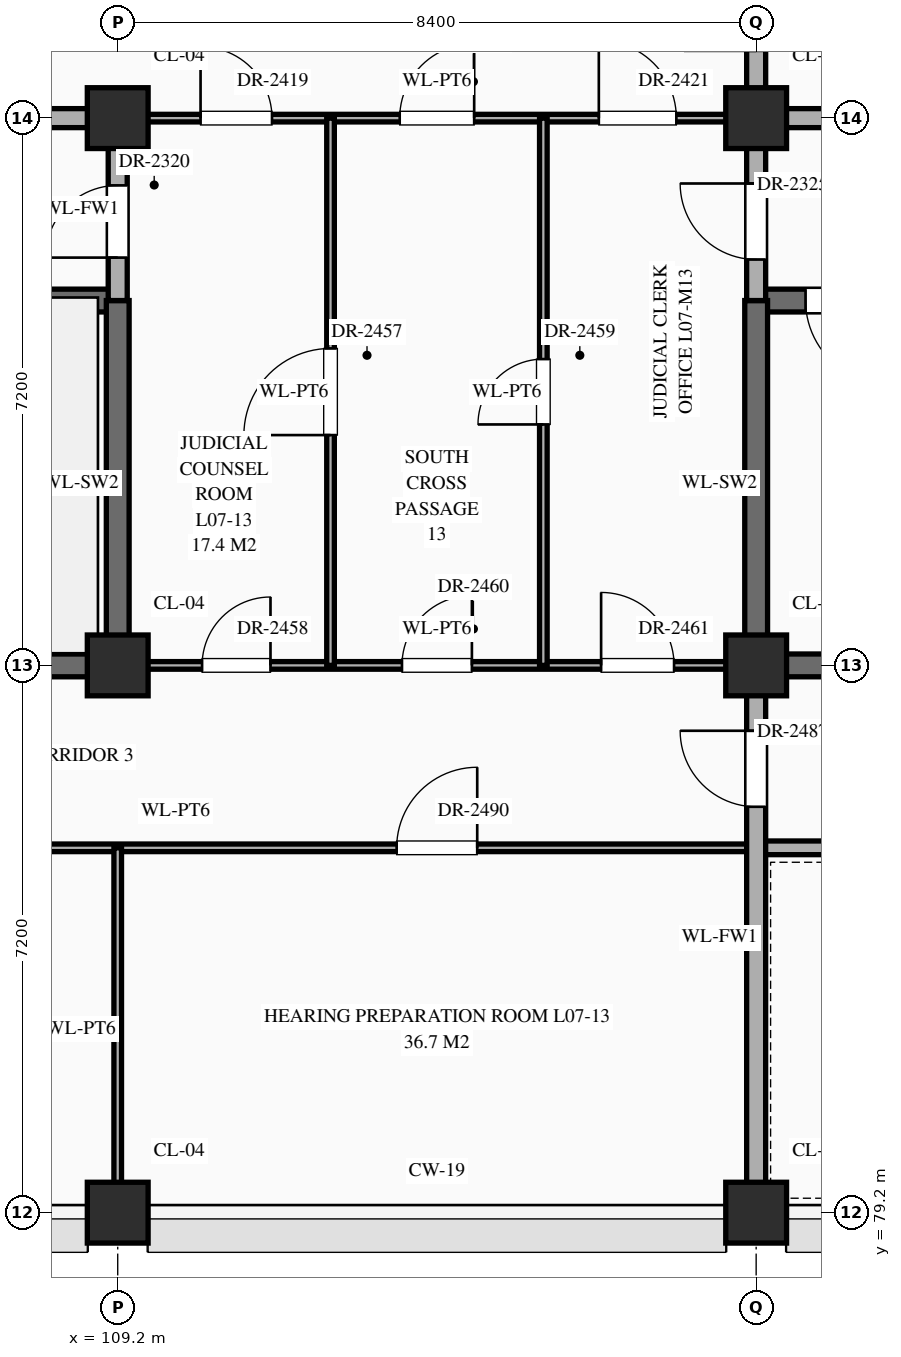
"""IFC4 building model, lengths in metres.
Left out: names, types, materials, properties, quantities, classifications, styles, units other than length and angle.
Written with IfcOpenShell. Run it as: python <this file> out.ifc"""

import sys

from ifc_helpers import new_model, si_unit, direction, frame, frame_2d, origin, origin_2d, place, context, subcontext, project, spatial, rectangle, extrude, element, fill, save


model = new_model("IFC4")
c1 = context("Model", 3, precision=1e-05, world=origin(), true_north=direction((0.0, 1.0)))
c2 = subcontext(c1, "Body", "Model", "MODEL_VIEW")
j1 = project(units=[si_unit("LENGTHUNIT", "METRE"), si_unit("PLANEANGLEUNIT", "RADIAN")], contexts=[c1])
p1 = place(None, origin())
s1 = spatial("IfcSite", under=j1, at=p1, CompositionType="ELEMENT")
p2 = place(p1, origin())
s2 = spatial("IfcBuilding", under=s1, at=p2, CompositionType="ELEMENT")
p3 = place(p2, frame((0.0, 0.0, 30.6)))
s3 = spatial("IfcBuildingStorey", under=s2, at=p3, CompositionType="ELEMENT", Elevation=30.6)
for number, where, z_axis, x_axis in (
    (1, (109.2, 79.2, 0.0), (0.0, 0.0, 1.0), (1.0, 0.0, 0.0)),
    (2, (109.2, 86.4, 0.0), (0.0, 0.0, 1.0), (1.0, 0.0, 0.0)),
    (3, (109.2, 93.6, 0.0), (0.0, 0.0, 1.0), (1.0, 0.0, 0.0)),
    (4, (117.6, 79.2, 0.0), (0.0, 0.0, 1.0), (1.0, 0.0, 0.0)),
    (5, (117.6, 86.4, 0.0), (0.0, 0.0, 1.0), (1.0, 0.0, 0.0)),
    (6, (117.6, 93.6, 0.0), (0.0, 0.0, 1.0), (1.0, 0.0, 0.0)),
):
    element("IfcColumn", number, at=place(p3, frame(where, z_axis=z_axis, x_axis=x_axis)), inside=s3, PredefinedType="COLUMN", context=c2, shape_type="SweptSolid", body=[
        extrude(rectangle(XDim=0.8, YDim=0.8, at=origin_2d()), origin(), (0.0, 0.0, 1.0), 4.5),
    ])
p4 = place(p3, frame((100.8, 84.0, 0.0), z_axis=(0.0, 0.0, 1.0), x_axis=(1.0, 0.0, 0.0)))
e7 = element("IfcWall", 7, at=p4, inside=s3, PredefinedType="STANDARD", context=c2, shape_type="SweptSolid", body=[
    extrude(rectangle(XDim=16.8, YDim=0.1, at=frame_2d((8.4, 0.0))), origin(), (0.0, 0.0, 1.0), 4.24),
])
p5 = place(p4, frame((3.69, 0.0, 0.0)))
e8 = element("IfcOpeningElement", 8, at=p5, cuts=e7, PredefinedType="OPENING", context=c2, shape_type="SweptSolid", body=[
    extrude(rectangle(XDim=1.02, YDim=2.4, at=frame_2d((0.51, 1.2))), frame((0.0, 0.062, 0.0), z_axis=(0.0, -1.0, 0.0), x_axis=(1.0, 0.0, 0.0)), (0.0, 0.0, 1.0), 0.124),
])
p6 = place(p4, frame((12.07, 0.0, 0.0)))
e9 = element("IfcOpeningElement", 9, at=p6, cuts=e7, PredefinedType="OPENING", context=c2, shape_type="SweptSolid", body=[
    extrude(rectangle(XDim=1.06, YDim=2.4, at=frame_2d((0.53, 1.2))), frame((0.0, 0.062, 0.0), z_axis=(0.0, -1.0, 0.0), x_axis=(1.0, 0.0, 0.0)), (0.0, 0.0, 1.0), 0.124),
])
p7 = place(p3, frame((117.6, 84.0, 0.0), z_axis=(0.0, 0.0, 1.0), x_axis=(1.0, 0.0, 0.0)))
e10 = element("IfcWall", 10, at=p7, inside=s3, PredefinedType="STANDARD", context=c2, shape_type="SweptSolid", body=[
    extrude(rectangle(XDim=16.8, YDim=0.18, at=frame_2d((8.4, 0.0))), origin(), (0.0, 0.0, 1.0), 4.24),
])
p8 = place(p7, frame((7.625, 0.0, 0.0)))
e11 = element("IfcOpeningElement", 11, at=p8, cuts=e10, PredefinedType="OPENING", context=c2, shape_type="SweptSolid", body=[
    extrude(rectangle(XDim=1.55, YDim=2.35, at=frame_2d((0.775, 1.175))), frame((0.0, 0.102, 0.0), z_axis=(0.0, -1.0, 0.0), x_axis=(1.0, 0.0, 0.0)), (0.0, 0.0, 1.0), 0.204),
])
p9 = place(p3, frame((100.8, 86.4, 0.0), z_axis=(0.0, 0.0, 1.0), x_axis=(1.0, 0.0, 0.0)))
e12 = element("IfcWall", 12, at=p9, inside=s3, PredefinedType="SHEAR", context=c2, shape_type="SweptSolid", body=[
    extrude(rectangle(XDim=8.4, YDim=0.3, at=frame_2d((4.2, 0.0))), origin(), (0.0, 0.0, 1.0), 4.24),
])
p10 = place(p3, frame((109.2, 86.4, 0.0), z_axis=(0.0, 0.0, 1.0), x_axis=(1.0, 0.0, 0.0)))
e13 = element("IfcWall", 13, at=p10, inside=s3, PredefinedType="STANDARD", context=c2, shape_type="SweptSolid", body=[
    extrude(rectangle(XDim=8.4, YDim=0.1, at=frame_2d((4.2, 0.0))), origin(), (0.0, 0.0, 1.0), 3.39),
])
p11 = place(p10, frame((1.11, 0.0, 0.0)))
e14 = element("IfcOpeningElement", 14, at=p11, cuts=e13, PredefinedType="OPENING", context=c2, shape_type="SweptSolid", body=[
    extrude(rectangle(XDim=0.9, YDim=2.15, at=frame_2d((0.45, 1.075))), frame((0.0, 0.062, 0.0), z_axis=(0.0, -1.0, 0.0), x_axis=(1.0, 0.0, 0.0)), (0.0, 0.0, 1.0), 0.124),
])
p12 = place(p10, frame((3.74, 0.0, 0.0)))
e15 = element("IfcOpeningElement", 15, at=p12, cuts=e13, PredefinedType="OPENING", context=c2, shape_type="SweptSolid", body=[
    extrude(rectangle(XDim=0.92, YDim=2.15, at=frame_2d((0.46, 1.075))), frame((0.0, 0.062, 0.0), z_axis=(0.0, -1.0, 0.0), x_axis=(1.0, 0.0, 0.0)), (0.0, 0.0, 1.0), 0.124),
])
p13 = place(p10, frame((6.36, 0.0, 0.0)))
e16 = element("IfcOpeningElement", 16, at=p13, cuts=e13, PredefinedType="OPENING", context=c2, shape_type="SweptSolid", body=[
    extrude(rectangle(XDim=0.96, YDim=2.2, at=frame_2d((0.48, 1.1))), frame((0.0, 0.062, 0.0), z_axis=(0.0, -1.0, 0.0), x_axis=(1.0, 0.0, 0.0)), (0.0, 0.0, 1.0), 0.124),
])
p14 = place(p3, frame((117.6, 86.4, 0.0), z_axis=(0.0, 0.0, 1.0), x_axis=(1.0, 0.0, 0.0)))
e17 = element("IfcWall", 17, at=p14, inside=s3, PredefinedType="SHEAR", context=c2, shape_type="SweptSolid", body=[
    extrude(rectangle(XDim=8.4, YDim=0.3, at=frame_2d((4.2, 0.0))), origin(), (0.0, 0.0, 1.0), 4.24),
])
p15 = place(p3, frame((100.8, 91.2, 0.0), z_axis=(0.0, 0.0, 1.0), x_axis=(1.0, 0.0, 0.0)))
e18 = element("IfcWall", 18, at=p15, inside=s3, PredefinedType="SHEAR", context=c2, shape_type="SweptSolid", body=[
    extrude(rectangle(XDim=8.4, YDim=0.3, at=frame_2d((4.2, 0.0))), origin(), (0.0, 0.0, 1.0), 4.24),
])
p16 = place(p15, frame((0.65, 0.0, 0.0)))
e19 = element("IfcOpeningElement", 19, at=p16, cuts=e18, PredefinedType="OPENING", context=c2, shape_type="SweptSolid", body=[
    extrude(rectangle(XDim=1.1, YDim=2.2, at=frame_2d((0.55, 1.1))), frame((0.0, 0.162, 0.0), z_axis=(0.0, -1.0, 0.0), x_axis=(1.0, 0.0, 0.0)), (0.0, 0.0, 1.0), 0.324),
])
p17 = place(p3, frame((117.6, 91.2, 0.0), z_axis=(0.0, 0.0, 1.0), x_axis=(1.0, 0.0, 0.0)))
e20 = element("IfcWall", 20, at=p17, inside=s3, PredefinedType="SHEAR", context=c2, shape_type="SweptSolid", body=[
    extrude(rectangle(XDim=8.4, YDim=0.3, at=frame_2d((4.2, 0.0))), origin(), (0.0, 0.0, 1.0), 4.24),
])
p18 = place(p17, frame((0.65, 0.0, 0.0)))
e21 = element("IfcOpeningElement", 21, at=p18, cuts=e20, PredefinedType="OPENING", context=c2, shape_type="SweptSolid", body=[
    extrude(rectangle(XDim=1.1, YDim=2.2, at=frame_2d((0.55, 1.1))), frame((0.0, 0.162, 0.0), z_axis=(0.0, -1.0, 0.0), x_axis=(1.0, 0.0, 0.0)), (0.0, 0.0, 1.0), 0.324),
])
p19 = place(p3, frame((100.8, 93.6, 0.0), z_axis=(0.0, 0.0, 1.0), x_axis=(1.0, 0.0, 0.0)))
e22 = element("IfcWall", 22, at=p19, inside=s3, PredefinedType="STANDARD", context=c2, shape_type="SweptSolid", body=[
    extrude(rectangle(XDim=8.4, YDim=0.25, at=frame_2d((4.2, 0.0))), origin(), (0.0, 0.0, 1.0), 3.39),
])
p20 = place(p19, frame((3.45, 0.0, 0.0)))
e23 = element("IfcOpeningElement", 23, at=p20, cuts=e22, PredefinedType="OPENING", context=c2, shape_type="SweptSolid", body=[
    extrude(rectangle(XDim=1.5, YDim=2.25, at=frame_2d((0.75, 1.125))), frame((0.0, 0.137, 0.0), z_axis=(0.0, -1.0, 0.0), x_axis=(1.0, 0.0, 0.0)), (0.0, 0.0, 1.0), 0.274),
])
p21 = place(p3, frame((109.2, 93.6, 0.0), z_axis=(0.0, 0.0, 1.0), x_axis=(1.0, 0.0, 0.0)))
e24 = element("IfcWall", 24, at=p21, inside=s3, PredefinedType="STANDARD", context=c2, shape_type="SweptSolid", body=[
    extrude(rectangle(XDim=8.4, YDim=0.1, at=frame_2d((4.2, 0.0))), origin(), (0.0, 0.0, 1.0), 3.39),
])
p22 = place(p21, frame((1.09, 0.0, 0.0)))
e25 = element("IfcOpeningElement", 25, at=p22, cuts=e24, PredefinedType="OPENING", context=c2, shape_type="SweptSolid", body=[
    extrude(rectangle(XDim=0.94, YDim=2.3, at=frame_2d((0.47, 1.15))), frame((0.0, 0.062, 0.0), z_axis=(0.0, -1.0, 0.0), x_axis=(1.0, 0.0, 0.0)), (0.0, 0.0, 1.0), 0.124),
])
p23 = place(p21, frame((3.71, 0.0, 0.0)))
e26 = element("IfcOpeningElement", 26, at=p23, cuts=e24, PredefinedType="OPENING", context=c2, shape_type="SweptSolid", body=[
    extrude(rectangle(XDim=0.98, YDim=2.35, at=frame_2d((0.49, 1.175))), frame((0.0, 0.062, 0.0), z_axis=(0.0, -1.0, 0.0), x_axis=(1.0, 0.0, 0.0)), (0.0, 0.0, 1.0), 0.124),
])
p24 = place(p21, frame((6.33, 0.0, 0.0)))
e27 = element("IfcOpeningElement", 27, at=p24, cuts=e24, PredefinedType="OPENING", context=c2, shape_type="SweptSolid", body=[
    extrude(rectangle(XDim=1.02, YDim=2.4, at=frame_2d((0.51, 1.2))), frame((0.0, 0.062, 0.0), z_axis=(0.0, -1.0, 0.0), x_axis=(1.0, 0.0, 0.0)), (0.0, 0.0, 1.0), 0.124),
])
p25 = place(p3, frame((117.6, 93.6, 0.0), z_axis=(0.0, 0.0, 1.0), x_axis=(1.0, 0.0, 0.0)))
e28 = element("IfcWall", 28, at=p25, inside=s3, PredefinedType="STANDARD", context=c2, shape_type="SweptSolid", body=[
    extrude(rectangle(XDim=8.4, YDim=0.25, at=frame_2d((4.2, 0.0))), origin(), (0.0, 0.0, 1.0), 3.39),
])
p26 = place(p25, frame((3.2, 0.0, 0.0)))
e29 = element("IfcOpeningElement", 29, at=p26, cuts=e28, PredefinedType="OPENING", context=c2, shape_type="SweptSolid", body=[
    extrude(rectangle(XDim=2.0, YDim=2.4, at=frame_2d((1.0, 1.2))), frame((0.0, 0.137, 0.0), z_axis=(0.0, -1.0, 0.0), x_axis=(1.0, 0.0, 0.0)), (0.0, 0.0, 1.0), 0.274),
])
p27 = place(p3, frame((109.2, 79.24, 0.0), z_axis=(0.0, 0.0, 1.0), x_axis=(0.0, 1.0, 0.0)))
e30 = element("IfcWall", 30, at=p27, inside=s3, PredefinedType="STANDARD", context=c2, shape_type="SweptSolid", body=[
    extrude(rectangle(XDim=4.76, YDim=0.1, at=frame_2d((2.38, 0.0))), origin(), (0.0, 0.0, 1.0), 3.49),
])
p28 = place(p3, frame((109.2, 86.4, 0.0), z_axis=(0.0, 0.0, 1.0), x_axis=(0.0, 1.0, 0.0)))
e31 = element("IfcWall", 31, at=p28, inside=s3, PredefinedType="SHEAR", context=c2, shape_type="SweptSolid", body=[
    extrude(rectangle(XDim=4.8, YDim=0.3, at=frame_2d((2.4, 0.0))), origin(), (0.0, 0.0, 1.0), 4.24),
])
p29 = place(p3, frame((109.2, 91.2, 0.0), z_axis=(0.0, 0.0, 1.0), x_axis=(0.0, 1.0, 0.0)))
e32 = element("IfcWall", 32, at=p29, inside=s3, PredefinedType="STANDARD", context=c2, shape_type="SweptSolid", body=[
    extrude(rectangle(XDim=2.4, YDim=0.25, at=frame_2d((1.2, 0.0))), origin(), (0.0, 0.0, 1.0), 3.49),
])
p30 = place(p29, frame((0.565, 0.0, 0.0)))
e33 = element("IfcOpeningElement", 33, at=p30, cuts=e32, PredefinedType="OPENING", context=c2, shape_type="SweptSolid", body=[
    extrude(rectangle(XDim=0.95, YDim=2.15, at=frame_2d((0.475, 1.075))), frame((0.0, 0.137, 0.0), z_axis=(0.0, -1.0, 0.0), x_axis=(1.0, 0.0, 0.0)), (0.0, 0.0, 1.0), 0.274),
])
p31 = place(p3, frame((112.0, 86.4, 0.0), z_axis=(0.0, 0.0, 1.0), x_axis=(0.0, 1.0, 0.0)))
e34 = element("IfcWall", 34, at=p31, inside=s3, PredefinedType="STANDARD", context=c2, shape_type="SweptSolid", body=[
    extrude(rectangle(XDim=7.2, YDim=0.1, at=frame_2d((3.6, 0.0))), origin(), (0.0, 0.0, 1.0), 4.24),
])
p32 = place(p31, frame((3.03, 0.0, 0.0)))
e35 = element("IfcOpeningElement", 35, at=p32, cuts=e34, PredefinedType="OPENING", context=c2, shape_type="SweptSolid", body=[
    extrude(rectangle(XDim=1.14, YDim=2.4, at=frame_2d((0.57, 1.2))), frame((0.0, 0.062, 0.0), z_axis=(0.0, -1.0, 0.0), x_axis=(1.0, 0.0, 0.0)), (0.0, 0.0, 1.0), 0.124),
])
p33 = place(p3, frame((114.8, 86.4, 0.0), z_axis=(0.0, 0.0, 1.0), x_axis=(0.0, 1.0, 0.0)))
e36 = element("IfcWall", 36, at=p33, inside=s3, PredefinedType="STANDARD", context=c2, shape_type="SweptSolid", body=[
    extrude(rectangle(XDim=7.2, YDim=0.1, at=frame_2d((3.6, 0.0))), origin(), (0.0, 0.0, 1.0), 4.24),
])
p34 = place(p33, frame((3.17, 0.0, 0.0)))
e37 = element("IfcOpeningElement", 37, at=p34, cuts=e36, PredefinedType="OPENING", context=c2, shape_type="SweptSolid", body=[
    extrude(rectangle(XDim=0.86, YDim=2.1, at=frame_2d((0.43, 1.05))), frame((0.0, 0.062, 0.0), z_axis=(0.0, -1.0, 0.0), x_axis=(1.0, 0.0, 0.0)), (0.0, 0.0, 1.0), 0.124),
])
p35 = place(p3, frame((117.6, 79.24, 0.0), z_axis=(0.0, 0.0, 1.0), x_axis=(0.0, 1.0, 0.0)))
e38 = element("IfcWall", 38, at=p35, inside=s3, PredefinedType="STANDARD", context=c2, shape_type="SweptSolid", body=[
    extrude(rectangle(XDim=7.16, YDim=0.25, at=frame_2d((3.58, 0.0))), origin(), (0.0, 0.0, 1.0), 3.49),
])
p36 = place(p35, frame((5.3, 0.0, 0.0)))
e39 = element("IfcOpeningElement", 39, at=p36, cuts=e38, PredefinedType="OPENING", context=c2, shape_type="SweptSolid", body=[
    extrude(rectangle(XDim=1.0, YDim=2.2, at=frame_2d((0.5, 1.1))), frame((0.0, 0.137, 0.0), z_axis=(0.0, -1.0, 0.0), x_axis=(1.0, 0.0, 0.0)), (0.0, 0.0, 1.0), 0.274),
])
p37 = place(p3, frame((117.6, 86.4, 0.0), z_axis=(0.0, 0.0, 1.0), x_axis=(0.0, 1.0, 0.0)))
e40 = element("IfcWall", 40, at=p37, inside=s3, PredefinedType="SHEAR", context=c2, shape_type="SweptSolid", body=[
    extrude(rectangle(XDim=4.8, YDim=0.3, at=frame_2d((2.4, 0.0))), origin(), (0.0, 0.0, 1.0), 4.24),
])
p38 = place(p3, frame((117.6, 91.2, 0.0), z_axis=(0.0, 0.0, 1.0), x_axis=(0.0, 1.0, 0.0)))
e41 = element("IfcWall", 41, at=p38, inside=s3, PredefinedType="STANDARD", context=c2, shape_type="SweptSolid", body=[
    extrude(rectangle(XDim=13.2, YDim=0.25, at=frame_2d((6.6, 0.0))), origin(), (0.0, 0.0, 1.0), 3.49),
])
p39 = place(p38, frame((0.54, 0.0, 0.0)))
e42 = element("IfcOpeningElement", 42, at=p39, cuts=e41, PredefinedType="OPENING", context=c2, shape_type="SweptSolid", body=[
    extrude(rectangle(XDim=1.0, YDim=2.2, at=frame_2d((0.5, 1.1))), frame((0.0, 0.137, 0.0), z_axis=(0.0, -1.0, 0.0), x_axis=(1.0, 0.0, 0.0)), (0.0, 0.0, 1.0), 0.274),
])
p40 = place(p38, frame((10.485, 0.0, 0.0)))
e43 = element("IfcOpeningElement", 43, at=p40, cuts=e41, PredefinedType="OPENING", context=c2, shape_type="SweptSolid", body=[
    extrude(rectangle(XDim=0.95, YDim=2.15, at=frame_2d((0.475, 1.075))), frame((0.0, 0.137, 0.0), z_axis=(0.0, -1.0, 0.0), x_axis=(1.0, 0.0, 0.0)), (0.0, 0.0, 1.0), 0.274),
])
p41 = place(p38, frame((3.285, 0.0, 0.0)))
e44 = element("IfcOpeningElement", 44, at=p41, cuts=e41, PredefinedType="OPENING", context=c2, shape_type="SweptSolid", body=[
    extrude(rectangle(XDim=0.95, YDim=2.15, at=frame_2d((0.475, 1.075))), frame((0.0, 0.137, 0.0), z_axis=(0.0, -1.0, 0.0), x_axis=(1.0, 0.0, 0.0)), (0.0, 0.0, 1.0), 0.274),
])
p42 = place(p18, frame((1.1, 0.0, 0.0), z_axis=(0.0, 0.0, 1.0), x_axis=(-1.0, 0.0, 0.0)))
e45 = element("IfcDoor", 45, at=p42, inside=s3, OperationType="SINGLE_SWING_LEFT", PredefinedType="DOOR", context=c2, shape_type="SweptSolid", body=[
    extrude(rectangle(XDim=1.1, YDim=2.2, at=frame_2d((0.55, 1.1))), frame((0.0, 0.025, 0.0), z_axis=(0.0, -1.0, 0.0), x_axis=(1.0, 0.0, 0.0)), (0.0, 0.0, 1.0), 0.05),
])
fill(e21, e45)
p43 = place(p30, origin())
e46 = element("IfcDoor", 46, at=p43, inside=s3, OperationType="SINGLE_SWING_LEFT", PredefinedType="DOOR", context=c2, shape_type="SweptSolid", body=[
    extrude(rectangle(XDim=0.95, YDim=2.15, at=frame_2d((0.475, 1.075))), frame((0.0, 0.025, 0.0), z_axis=(0.0, -1.0, 0.0), x_axis=(1.0, 0.0, 0.0)), (0.0, 0.0, 1.0), 0.05),
])
fill(e33, e46)
p44 = place(p39, origin())
e47 = element("IfcDoor", 47, at=p44, inside=s3, OperationType="SINGLE_SWING_RIGHT", PredefinedType="DOOR", context=c2, shape_type="SweptSolid", body=[
    extrude(rectangle(XDim=1.0, YDim=2.2, at=frame_2d((0.5, 1.1))), frame((0.0, 0.025, 0.0), z_axis=(0.0, -1.0, 0.0), x_axis=(1.0, 0.0, 0.0)), (0.0, 0.0, 1.0), 0.05),
])
fill(e42, e47)
p45 = place(p22, origin())
e48 = element("IfcDoor", 48, at=p45, inside=s3, OperationType="SINGLE_SWING_LEFT", PredefinedType="DOOR", context=c2, shape_type="SweptSolid", body=[
    extrude(rectangle(XDim=0.94, YDim=2.3, at=frame_2d((0.47, 1.15))), frame((0.0, 0.025, 0.0), z_axis=(0.0, -1.0, 0.0), x_axis=(1.0, 0.0, 0.0)), (0.0, 0.0, 1.0), 0.05),
])
fill(e25, e48)
p46 = place(p23, origin())
e49 = element("IfcDoor", 49, at=p46, inside=s3, OperationType="SINGLE_SWING_RIGHT", PredefinedType="DOOR", context=c2, shape_type="SweptSolid", body=[
    extrude(rectangle(XDim=0.98, YDim=2.35, at=frame_2d((0.49, 1.175))), frame((0.0, 0.025, 0.0), z_axis=(0.0, -1.0, 0.0), x_axis=(1.0, 0.0, 0.0)), (0.0, 0.0, 1.0), 0.05),
])
fill(e26, e49)
p47 = place(p24, origin())
e50 = element("IfcDoor", 50, at=p47, inside=s3, OperationType="SINGLE_SWING_LEFT", PredefinedType="DOOR", context=c2, shape_type="SweptSolid", body=[
    extrude(rectangle(XDim=1.02, YDim=2.4, at=frame_2d((0.51, 1.2))), frame((0.0, 0.025, 0.0), z_axis=(0.0, -1.0, 0.0), x_axis=(1.0, 0.0, 0.0)), (0.0, 0.0, 1.0), 0.05),
])
fill(e27, e50)
p48 = place(p32, origin())
e51 = element("IfcDoor", 51, at=p48, inside=s3, OperationType="SINGLE_SWING_LEFT", PredefinedType="DOOR", context=c2, shape_type="SweptSolid", body=[
    extrude(rectangle(XDim=1.14, YDim=2.4, at=frame_2d((0.57, 1.2))), frame((0.0, 0.025, 0.0), z_axis=(0.0, -1.0, 0.0), x_axis=(1.0, 0.0, 0.0)), (0.0, 0.0, 1.0), 0.05),
])
fill(e35, e51)
p49 = place(p11, origin())
e52 = element("IfcDoor", 52, at=p49, inside=s3, OperationType="SINGLE_SWING_RIGHT", PredefinedType="DOOR", context=c2, shape_type="SweptSolid", body=[
    extrude(rectangle(XDim=0.9, YDim=2.15, at=frame_2d((0.45, 1.075))), frame((0.0, 0.025, 0.0), z_axis=(0.0, -1.0, 0.0), x_axis=(1.0, 0.0, 0.0)), (0.0, 0.0, 1.0), 0.05),
])
fill(e14, e52)
p50 = place(p34, origin())
e53 = element("IfcDoor", 53, at=p50, inside=s3, OperationType="SINGLE_SWING_LEFT", PredefinedType="DOOR", context=c2, shape_type="SweptSolid", body=[
    extrude(rectangle(XDim=0.86, YDim=2.1, at=frame_2d((0.43, 1.05))), frame((0.0, 0.025, 0.0), z_axis=(0.0, -1.0, 0.0), x_axis=(1.0, 0.0, 0.0)), (0.0, 0.0, 1.0), 0.05),
])
fill(e37, e53)
p51 = place(p12, origin())
e54 = element("IfcDoor", 54, at=p51, inside=s3, OperationType="SINGLE_SWING_RIGHT", PredefinedType="DOOR", context=c2, shape_type="SweptSolid", body=[
    extrude(rectangle(XDim=0.92, YDim=2.15, at=frame_2d((0.46, 1.075))), frame((0.0, 0.025, 0.0), z_axis=(0.0, -1.0, 0.0), x_axis=(1.0, 0.0, 0.0)), (0.0, 0.0, 1.0), 0.05),
])
fill(e15, e54)
p52 = place(p13, origin())
e55 = element("IfcDoor", 55, at=p52, inside=s3, OperationType="SINGLE_SWING_LEFT", PredefinedType="DOOR", context=c2, shape_type="SweptSolid", body=[
    extrude(rectangle(XDim=0.96, YDim=2.2, at=frame_2d((0.48, 1.1))), frame((0.0, 0.025, 0.0), z_axis=(0.0, -1.0, 0.0), x_axis=(1.0, 0.0, 0.0)), (0.0, 0.0, 1.0), 0.05),
])
fill(e16, e55)
p53 = place(p36, origin())
e56 = element("IfcDoor", 56, at=p53, inside=s3, OperationType="SINGLE_SWING_RIGHT", PredefinedType="DOOR", context=c2, shape_type="SweptSolid", body=[
    extrude(rectangle(XDim=1.0, YDim=2.2, at=frame_2d((0.5, 1.1))), frame((0.0, 0.025, 0.0), z_axis=(0.0, -1.0, 0.0), x_axis=(1.0, 0.0, 0.0)), (0.0, 0.0, 1.0), 0.05),
])
fill(e39, e56)
p54 = place(p6, origin())
e57 = element("IfcDoor", 57, at=p54, inside=s3, OperationType="SINGLE_SWING_RIGHT", PredefinedType="DOOR", context=c2, shape_type="SweptSolid", body=[
    extrude(rectangle(XDim=1.06, YDim=2.4, at=frame_2d((0.53, 1.2))), frame((0.0, 0.025, 0.0), z_axis=(0.0, -1.0, 0.0), x_axis=(1.0, 0.0, 0.0)), (0.0, 0.0, 1.0), 0.05),
])
fill(e9, e57)
save(model, sys.argv[1])
